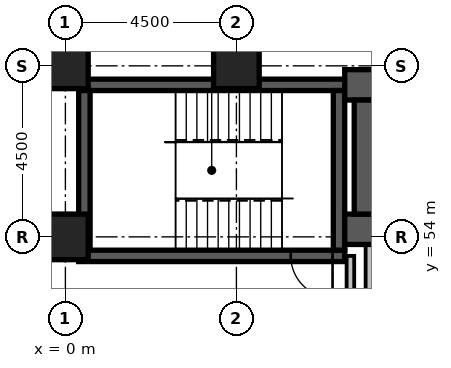
"""IFC4 building model, lengths in metres.
Left out: names, types, materials, properties, quantities, classifications, styles, units other than length and angle.
Written with IfcOpenShell. Run it as: python <this file> out.ifc"""

import sys

from ifc_helpers import new_model, si_unit, direction, frame, frame_2d, origin, origin_2d, place, context, subcontext, project, spatial, rectangle, extrude, element, fill, save


model = new_model("IFC4")
c1 = context("Model", 3, precision=1e-05, world=origin(), true_north=direction((0.0, 1.0)))
c2 = subcontext(c1, "Body", "Model", "MODEL_VIEW")
j1 = project(units=[si_unit("LENGTHUNIT", "METRE"), si_unit("PLANEANGLEUNIT", "RADIAN")], contexts=[c1])
p1 = place(None, origin())
s1 = spatial("IfcSite", under=j1, at=p1, CompositionType="ELEMENT")
p2 = place(p1, origin())
s2 = spatial("IfcBuilding", under=s1, at=p2, CompositionType="ELEMENT")
p3 = place(p2, frame((0.0, 0.0, 75.8)))
s3 = spatial("IfcBuildingStorey", under=s2, at=p3, CompositionType="ELEMENT", Elevation=75.8)
p4 = place(p3, frame((0.35, 53.5, -0.3), z_axis=(0.0, 0.0, 1.0), x_axis=(1.0, 0.0, 0.0)))
e1 = element("IfcWall", 1, at=p4, inside=s3, PredefinedType="SHEAR", context=c2, shape_type="SweptSolid", body=[
    extrude(rectangle(XDim=7.0, YDim=0.3, at=frame_2d((3.5, 0.0))), origin(), (0.0, 0.0, 1.0), 3.6),
])
p5 = place(p4, frame((5.58, 0.0, 0.3)))
e2 = element("IfcOpeningElement", 2, at=p5, cuts=e1, PredefinedType="OPENING", context=c2, shape_type="SweptSolid", body=[
    extrude(rectangle(XDim=1.1, YDim=2.1, at=frame_2d((0.55, 1.05))), frame((0.0, 0.162, 0.0), z_axis=(0.0, -1.0, 0.0), x_axis=(1.0, 0.0, 0.0)), (0.0, 0.0, 1.0), 0.324),
])
p6 = place(p3, frame((0.35, 58.0, -0.3), z_axis=(0.0, 0.0, 1.0), x_axis=(1.0, 0.0, 0.0)))
e3 = element("IfcWall", 3, at=p6, inside=s3, PredefinedType="SHEAR", context=c2, shape_type="SweptSolid", body=[
    extrude(rectangle(XDim=7.0, YDim=0.3, at=frame_2d((3.5, 0.0))), origin(), (0.0, 0.0, 1.0), 3.6),
])
for number, where, z_axis, x_axis in (
    (4, (0.5, 53.65, -0.3), (0.0, 0.0, 1.0), (0.0, 1.0, 0.0)),
    (5, (7.2, 53.65, -0.3), (0.0, 0.0, 1.0), (0.0, 1.0, 0.0)),
):
    element("IfcWall", number, at=place(p3, frame(where, z_axis=z_axis, x_axis=x_axis)), inside=s3, PredefinedType="SHEAR", context=c2, shape_type="SweptSolid", body=[
        extrude(rectangle(XDim=4.2, YDim=0.3, at=frame_2d((2.1, 0.0))), origin(), (0.0, 0.0, 1.0), 3.6),
    ])
p7 = place(p3, frame((7.35, 54.2, -0.3), z_axis=(0.0, 0.0, 1.0), x_axis=(1.0, 0.0, 0.0)))
e6 = element("IfcWall", 6, at=p7, inside=s3, PredefinedType="SHEAR", context=c2, shape_type="SweptSolid", body=[
    extrude(rectangle(XDim=16.45, YDim=0.8, at=frame_2d((8.225, 0.0))), origin(), (0.0, 0.0, 1.0), 3.6),
])
p8 = place(p7, frame((1.35, 0.0, 0.3)))
e7 = element("IfcOpeningElement", 7, at=p8, cuts=e6, PredefinedType="OPENING", context=c2, shape_type="SweptSolid", body=[
    extrude(rectangle(XDim=1.1, YDim=2.1, at=frame_2d((0.55, 1.05))), frame((0.0, 0.412, 0.0), z_axis=(0.0, -1.0, 0.0), x_axis=(1.0, 0.0, 0.0)), (0.0, 0.0, 1.0), 0.824),
])
p9 = place(p7, frame((3.85, 0.0, 0.3)))
e8 = element("IfcOpeningElement", 8, at=p9, cuts=e6, PredefinedType="OPENING", context=c2, shape_type="SweptSolid", body=[
    extrude(rectangle(XDim=1.1, YDim=2.1, at=frame_2d((0.55, 1.05))), frame((0.0, 0.412, 0.0), z_axis=(0.0, -1.0, 0.0), x_axis=(1.0, 0.0, 0.0)), (0.0, 0.0, 1.0), 0.824),
])
p10 = place(p7, frame((6.35, 0.0, 0.3)))
e9 = element("IfcOpeningElement", 9, at=p10, cuts=e6, PredefinedType="OPENING", context=c2, shape_type="SweptSolid", body=[
    extrude(rectangle(XDim=1.1, YDim=2.1, at=frame_2d((0.55, 1.05))), frame((0.0, 0.412, 0.0), z_axis=(0.0, -1.0, 0.0), x_axis=(1.0, 0.0, 0.0)), (0.0, 0.0, 1.0), 0.824),
])
p11 = place(p7, frame((8.85, 0.0, 0.3)))
e10 = element("IfcOpeningElement", 10, at=p11, cuts=e6, PredefinedType="OPENING", context=c2, shape_type="SweptSolid", body=[
    extrude(rectangle(XDim=1.1, YDim=2.1, at=frame_2d((0.55, 1.05))), frame((0.0, 0.412, 0.0), z_axis=(0.0, -1.0, 0.0), x_axis=(1.0, 0.0, 0.0)), (0.0, 0.0, 1.0), 0.824),
])
p12 = place(p7, frame((11.35, 0.0, 0.3)))
e11 = element("IfcOpeningElement", 11, at=p12, cuts=e6, PredefinedType="OPENING", context=c2, shape_type="SweptSolid", body=[
    extrude(rectangle(XDim=1.1, YDim=2.1, at=frame_2d((0.55, 1.05))), frame((0.0, 0.412, 0.0), z_axis=(0.0, -1.0, 0.0), x_axis=(1.0, 0.0, 0.0)), (0.0, 0.0, 1.0), 0.824),
])
p13 = place(p7, frame((13.85, 0.0, 0.3)))
e12 = element("IfcOpeningElement", 12, at=p13, cuts=e6, PredefinedType="OPENING", context=c2, shape_type="SweptSolid", body=[
    extrude(rectangle(XDim=1.1, YDim=2.1, at=frame_2d((0.55, 1.05))), frame((0.0, 0.412, 0.0), z_axis=(0.0, -1.0, 0.0), x_axis=(1.0, 0.0, 0.0)), (0.0, 0.0, 1.0), 0.824),
])
p14 = place(p3, frame((7.35, 58.0, -0.3), z_axis=(0.0, 0.0, 1.0), x_axis=(1.0, 0.0, 0.0)))
e13 = element("IfcWall", 13, at=p14, inside=s3, PredefinedType="SHEAR", context=c2, shape_type="SweptSolid", body=[
    extrude(rectangle(XDim=16.45, YDim=0.8, at=frame_2d((8.225, 0.0))), origin(), (0.0, 0.0, 1.0), 3.6),
])
p15 = place(p3, frame((8.0, 54.6, -0.3), z_axis=(0.0, 0.0, 1.0), x_axis=(0.0, 1.0, 0.0)))
e14 = element("IfcWall", 14, at=p15, inside=s3, PredefinedType="SHEAR", context=c2, shape_type="SweptSolid", body=[
    extrude(rectangle(XDim=3.0, YDim=0.8, at=frame_2d((1.5, 0.0))), origin(), (0.0, 0.0, 1.0), 3.6),
])
for number, where, z_axis, x_axis in (
    (15, (0.0, 54.0, -0.3), (0.0, 0.0, 1.0), (1.0, 0.0, 0.0)),
    (16, (0.0, 58.5, -0.3), (0.0, 0.0, 1.0), (1.0, 0.0, 0.0)),
    (17, (4.5, 58.5, -0.3), (0.0, 0.0, 1.0), (1.0, 0.0, 0.0)),
):
    element("IfcColumn", number, at=place(p3, frame(where, z_axis=z_axis, x_axis=x_axis)), inside=s3, PredefinedType="COLUMN", context=c2, shape_type="SweptSolid", body=[
        extrude(rectangle(XDim=1.2, YDim=1.2, at=origin_2d()), origin(), (0.0, 0.0, 1.0), 3.6),
    ])
p16 = place(p3, frame((8.0, 51.45, 0.0), z_axis=(0.0, 0.0, 1.0), x_axis=(0.0, 1.0, 0.0)))
e18 = element("IfcWall", 18, at=p16, inside=s3, PredefinedType="PARTITIONING", context=c2, shape_type="SweptSolid", body=[
    extrude(rectangle(XDim=2.33, YDim=0.2, at=frame_2d((1.165, 0.0))), origin(), (0.0, 0.0, 1.0), 3.3),
])
p17 = place(p3, frame((7.5, 49.6, 0.0), z_axis=(0.0, 0.0, 1.0), x_axis=(0.0, 1.0, 0.0)))
e19 = element("IfcWall", 19, at=p17, inside=s3, PredefinedType="PARTITIONING", context=c2, shape_type="SweptSolid", body=[
    extrude(rectangle(XDim=3.9, YDim=0.2, at=frame_2d((1.95, 0.0))), origin(), (0.0, 0.0, 1.0), 3.3),
])
p18 = place(p17, frame((0.3, 0.0, 0.0)))
e20 = element("IfcOpeningElement", 20, at=p18, cuts=e19, PredefinedType="OPENING", context=c2, shape_type="SweptSolid", body=[
    extrude(rectangle(XDim=1.2, YDim=2.1, at=frame_2d((0.6, 1.05))), frame((0.0, 0.112, 0.0), z_axis=(0.0, -1.0, 0.0), x_axis=(1.0, 0.0, 0.0)), (0.0, 0.0, 1.0), 0.224),
])
p19 = place(p5, origin())
e21 = element("IfcDoor", 21, at=p19, inside=s3, OperationType="SINGLE_SWING_RIGHT", PredefinedType="DOOR", context=c2, shape_type="SweptSolid", body=[
    extrude(rectangle(XDim=1.1, YDim=2.1, at=frame_2d((0.55, 1.05))), frame((0.0, 0.025, 0.0), z_axis=(0.0, -1.0, 0.0), x_axis=(1.0, 0.0, 0.0)), (0.0, 0.0, 1.0), 0.05),
])
fill(e2, e21)
save(model, sys.argv[1])
